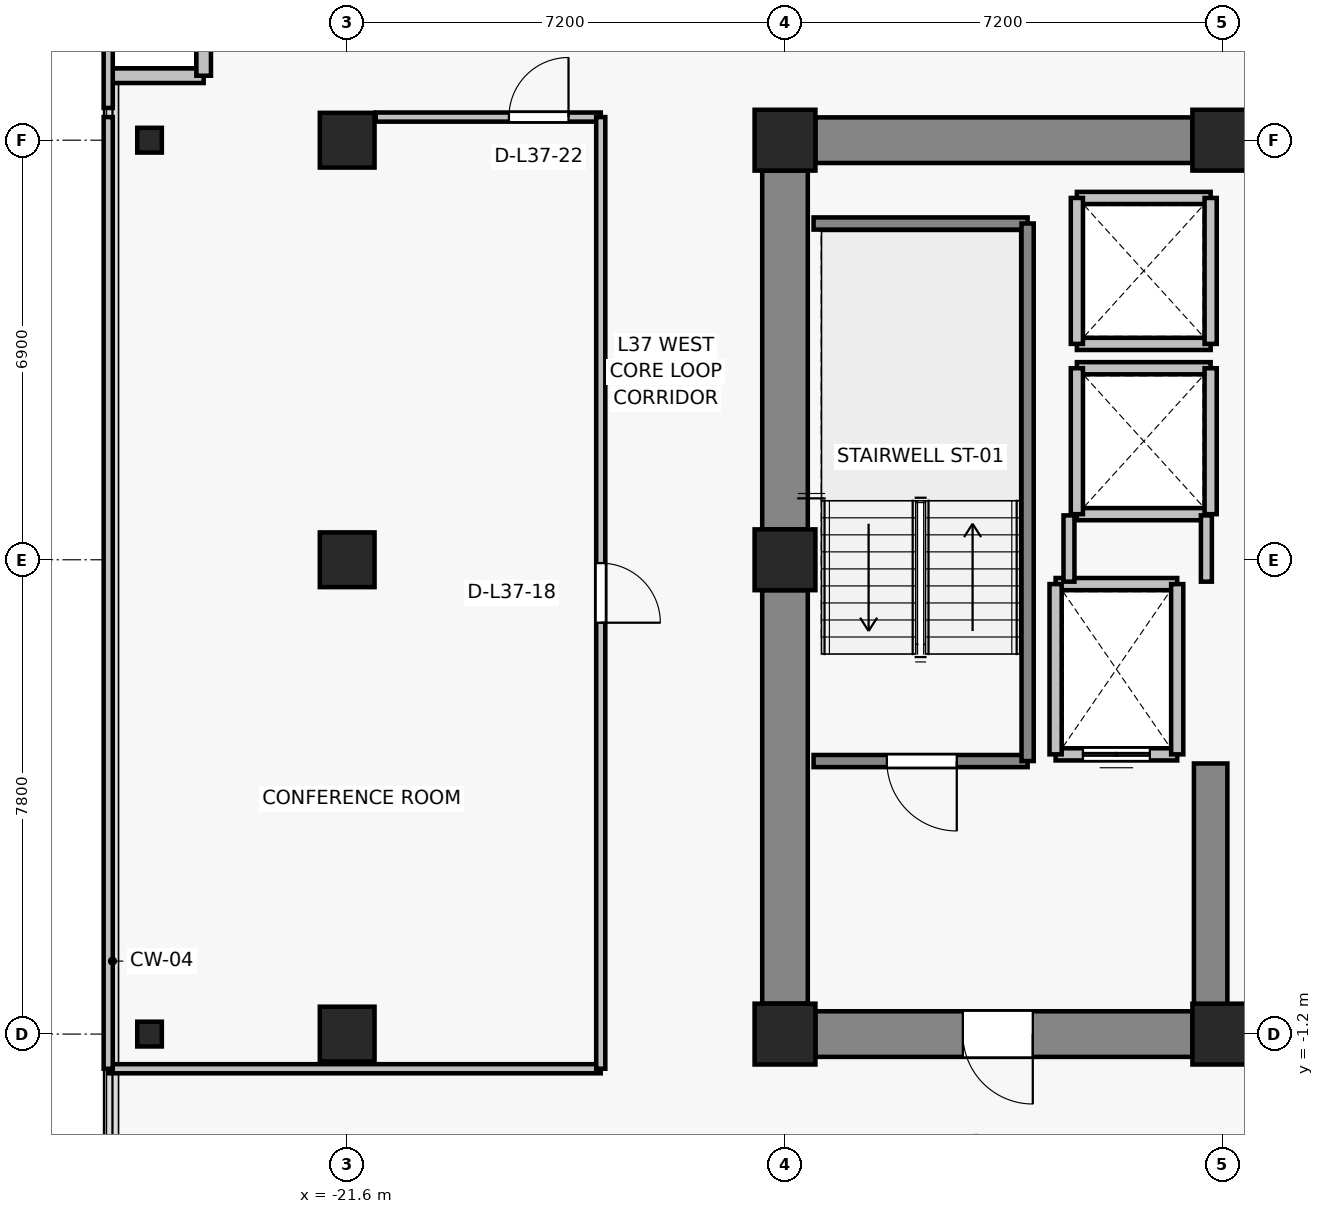
"""IFC4 building model, lengths in metres.
Left out: names, types, materials, properties, quantities, classifications, styles, units other than length and angle.
Written with IfcOpenShell. Run it as: python <this file> out.ifc"""

import sys

from ifc_helpers import new_model, si_unit, direction, frame, frame_2d, origin, origin_2d, place, context, subcontext, project, spatial, rectangle, i_section, extrude, source, transform, mapped, element, fill, save


model = new_model("IFC4")
c1 = context("Model", 3, precision=1e-05, world=origin(), true_north=direction((0.0, 1.0)))
c2 = subcontext(c1, "Body", "Model", "MODEL_VIEW")
j1 = project(units=[si_unit("LENGTHUNIT", "METRE"), si_unit("PLANEANGLEUNIT", "RADIAN")], contexts=[c1])
p1 = place(None, origin())
s1 = spatial("IfcSite", under=j1, at=p1, CompositionType="ELEMENT")
p2 = place(p1, origin())
s2 = spatial("IfcBuilding", under=s1, at=p2, CompositionType="ELEMENT")
p3 = place(p2, frame((0.0, 0.0, 133.0)))
s3 = spatial("IfcBuildingStorey", under=s2, at=p3, CompositionType="ELEMENT", Elevation=133.0)
for number, where, z_axis, x_axis in (
    (1, (-14.4, -1.2, 0.0), (0.0, 0.0, 1.0), (1.0, 0.0, 0.0)),
    (2, (-7.2, -1.2, 0.0), (0.0, 0.0, 1.0), (1.0, 0.0, 0.0)),
    (3, (-14.4, 6.6, 0.0), (0.0, 0.0, 1.0), (1.0, 0.0, 0.0)),
    (4, (-14.4, 13.5, 0.0), (0.0, 0.0, 1.0), (1.0, 0.0, 0.0)),
    (5, (-7.2, 13.5, 0.0), (0.0, 0.0, 1.0), (1.0, 0.0, 0.0)),
):
    element("IfcColumn", number, at=place(p3, frame(where, z_axis=z_axis, x_axis=x_axis)), inside=s3, PredefinedType="COLUMN", context=c2, shape_type="SweptSolid", body=[
        extrude(rectangle(XDim=1.0, YDim=1.0, at=origin_2d()), origin(), (0.0, 0.0, 1.0), 3.3),
    ])
for number, where, z_axis, x_axis in (
    (6, (-21.6, -1.2, 0.0), (0.0, 0.0, 1.0), (1.0, 0.0, 0.0)),
    (7, (-21.6, 6.6, 0.0), (0.0, 0.0, 1.0), (1.0, 0.0, 0.0)),
    (8, (-21.6, 13.5, 0.0), (0.0, 0.0, 1.0), (1.0, 0.0, 0.0)),
):
    element("IfcColumn", number, at=place(p3, frame(where, z_axis=z_axis, x_axis=x_axis)), inside=s3, PredefinedType="COLUMN", context=c2, shape_type="SweptSolid", body=[
        extrude(rectangle(XDim=0.9, YDim=0.9, at=origin_2d()), origin(), (0.0, 0.0, 1.0), 3.3),
    ])
for number, where, z_axis, x_axis in (
    (9, (-24.85, -1.2, 0.0), (0.0, 0.0, 1.0), (1.0, 0.0, 0.0)),
    (10, (-24.85, 13.5, 0.0), (0.0, 0.0, 1.0), (1.0, 0.0, 0.0)),
):
    element("IfcColumn", number, at=place(p3, frame(where, z_axis=z_axis, x_axis=x_axis)), inside=s3, PredefinedType="COLUMN", context=c2, shape_type="SweptSolid", body=[
        extrude(i_section(OverallWidth=0.404, OverallDepth=0.407, WebThickness=0.022, FlangeThickness=0.032, FilletRadius=0.015, at=origin_2d()), origin(), (0.0, 0.0, 1.0), 3.3),
    ])
p4 = place(p3, frame((-13.9, 13.5, 0.0), z_axis=(0.0, 0.0, 1.0), x_axis=(1.0, 0.0, 0.0)))
e11 = element("IfcWall", 11, at=p4, inside=s3, PredefinedType="SHEAR", context=c2, shape_type="SweptSolid", body=[
    extrude(rectangle(XDim=6.2, YDim=0.75, at=frame_2d((3.1, 0.0))), origin(), (0.0, 0.0, 1.0), 3.075),
])
p5 = place(p3, frame((-14.4, -0.7, 0.0), z_axis=(0.0, 0.0, 1.0), x_axis=(0.0, 1.0, 0.0)))
e12 = element("IfcWall", 12, at=p5, inside=s3, PredefinedType="SHEAR", context=c2, shape_type="SweptSolid", body=[
    extrude(rectangle(XDim=6.8, YDim=0.75, at=frame_2d((3.4, 0.0))), origin(), (0.0, 0.0, 1.0), 3.075),
])
p6 = place(p3, frame((-14.4, 7.1, 0.0), z_axis=(0.0, 0.0, 1.0), x_axis=(0.0, 1.0, 0.0)))
e13 = element("IfcWall", 13, at=p6, inside=s3, PredefinedType="SHEAR", context=c2, shape_type="SweptSolid", body=[
    extrude(rectangle(XDim=5.9, YDim=0.75, at=frame_2d((2.95, 0.0))), origin(), (0.0, 0.0, 1.0), 3.075),
])
p7 = place(p3, frame((-7.7, -1.2, 0.0), z_axis=(0.0, 0.0, 1.0), x_axis=(-1.0, 0.0, 0.0)))
e14 = element("IfcWall", 14, at=p7, inside=s3, PredefinedType="SHEAR", context=c2, shape_type="SweptSolid", body=[
    extrude(rectangle(XDim=6.2, YDim=0.75, at=frame_2d((3.1, 0.0))), origin(), (0.0, 0.0, 1.0), 3.075),
])
p8 = place(p7, frame((2.625, 0.0, 0.0)))
e15 = element("IfcOpeningElement", 15, at=p8, cuts=e14, PredefinedType="OPENING", context=c2, shape_type="SweptSolid", body=[
    extrude(rectangle(XDim=1.15, YDim=2.15, at=frame_2d((0.575, 1.075))), frame((0.0, 0.385, 0.0), z_axis=(0.0, -1.0, 0.0), x_axis=(1.0, 0.0, 0.0)), (0.0, 0.0, 1.0), 0.77),
])
p9 = place(p3, frame((-7.4, -0.825, 0.0), z_axis=(0.0, 0.0, 1.0), x_axis=(0.0, 1.0, 0.0)))
e16 = element("IfcWall", 16, at=p9, inside=s3, PredefinedType="SHEAR", context=c2, shape_type="SweptSolid", body=[
    extrude(rectangle(XDim=4.075, YDim=0.55, at=frame_2d((2.038, 0.0))), origin(), (0.0, 0.0, 1.0), 3.075),
])
for number, where, z_axis, x_axis in (
    (17, (-23.96, 14.56, 0.0), (0.0, 0.0, 1.0), (-1.0, 0.0, 0.0)),
    (18, (-23.96, 16.06, 0.0), (0.0, 0.0, 1.0), (0.0, -1.0, 0.0)),
):
    element("IfcWall", number, at=place(p3, frame(where, z_axis=z_axis, x_axis=x_axis)), inside=s3, PredefinedType="SOLIDWALL", context=c2, shape_type="SweptSolid", body=[
        extrude(rectangle(XDim=1.5, YDim=0.24, at=frame_2d((0.75, 0.0))), origin(), (0.0, 0.0, 1.0), 3.075),
    ])
p10 = place(p3, frame((-7.95, 3.4, 0.0), z_axis=(0.0, 0.0, 1.0), x_axis=(-1.0, 0.0, 0.0)))
e19 = element("IfcWall", 19, at=p10, inside=s3, PredefinedType="SOLIDWALL", context=c2, shape_type="SweptSolid", body=[
    extrude(rectangle(XDim=2.0, YDim=0.2, at=frame_2d((1.0, 0.0))), origin(), (0.0, 0.0, 1.0), 3.075),
])
p11 = place(p10, frame((0.45, 0.0, 0.0)))
e20 = element("IfcOpeningElement", 20, at=p11, cuts=e19, PredefinedType="OPENING", context=c2, shape_type="SweptSolid", body=[
    extrude(rectangle(XDim=1.1, YDim=2.2, at=frame_2d((0.55, 1.1))), frame((0.0, 0.11, 0.0), z_axis=(0.0, -1.0, 0.0), x_axis=(1.0, 0.0, 0.0)), (0.0, 0.0, 1.0), 0.22),
])
p12 = place(p3, frame((-9.95, 6.2, 0.0), z_axis=(0.0, 0.0, 1.0), x_axis=(1.0, 0.0, 0.0)))
e21 = element("IfcWall", 21, at=p12, inside=s3, PredefinedType="SOLIDWALL", context=c2, shape_type="SweptSolid", body=[
    extrude(rectangle(XDim=2.0, YDim=0.2, at=frame_2d((1.0, 0.0))), origin(), (0.0, 0.0, 1.0), 3.075),
])
for number, where, z_axis, x_axis in (
    (22, (-9.95, 3.4, 0.0), (0.0, 0.0, 1.0), (0.0, 1.0, 0.0)),
    (23, (-7.95, 6.2, 0.0), (0.0, 0.0, 1.0), (0.0, -1.0, 0.0)),
):
    element("IfcWall", number, at=place(p3, frame(where, z_axis=z_axis, x_axis=x_axis)), inside=s3, PredefinedType="SOLIDWALL", context=c2, shape_type="SweptSolid", body=[
        extrude(rectangle(XDim=2.8, YDim=0.2, at=frame_2d((1.4, 0.0))), origin(), (0.0, 0.0, 1.0), 3.075),
    ])
for number, where, z_axis, x_axis in (
    (24, (-7.4, 7.35, 0.0), (0.0, 0.0, 1.0), (-1.0, 0.0, 0.0)),
    (25, (-9.6, 9.75, 0.0), (0.0, 0.0, 1.0), (1.0, 0.0, 0.0)),
):
    element("IfcWall", number, at=place(p3, frame(where, z_axis=z_axis, x_axis=x_axis)), inside=s3, PredefinedType="SOLIDWALL", context=c2, shape_type="SweptSolid", body=[
        extrude(rectangle(XDim=2.2, YDim=0.2, at=frame_2d((1.1, 0.0))), origin(), (0.0, 0.0, 1.0), 2.515),
    ])
p13 = place(p3, frame((-9.6, 7.35, 0.0), z_axis=(0.0, 0.0, 1.0), x_axis=(0.0, 1.0, 0.0)))
e26 = element("IfcWall", 26, at=p13, inside=s3, PredefinedType="SOLIDWALL", context=c2, shape_type="SweptSolid", body=[
    extrude(rectangle(XDim=2.4, YDim=0.2, at=frame_2d((1.2, 0.0))), origin(), (0.0, 0.0, 1.0), 3.075),
])
p14 = place(p3, frame((-7.4, 9.75, 0.0), z_axis=(0.0, 0.0, 1.0), x_axis=(0.0, -1.0, 0.0)))
e27 = element("IfcWall", 27, at=p14, inside=s3, PredefinedType="SOLIDWALL", context=c2, shape_type="SweptSolid", body=[
    extrude(rectangle(XDim=2.4, YDim=0.2, at=frame_2d((1.2, 0.0))), origin(), (0.0, 0.0, 1.0), 2.515),
])
for number, where, z_axis, x_axis in (
    (28, (-7.4, 10.15, 0.0), (0.0, 0.0, 1.0), (-1.0, 0.0, 0.0)),
    (29, (-9.6, 12.55, 0.0), (0.0, 0.0, 1.0), (1.0, 0.0, 0.0)),
):
    element("IfcWall", number, at=place(p3, frame(where, z_axis=z_axis, x_axis=x_axis)), inside=s3, PredefinedType="SOLIDWALL", context=c2, shape_type="SweptSolid", body=[
        extrude(rectangle(XDim=2.2, YDim=0.2, at=frame_2d((1.1, 0.0))), origin(), (0.0, 0.0, 1.0), 2.515),
    ])
p15 = place(p3, frame((-9.6, 10.15, 0.0), z_axis=(0.0, 0.0, 1.0), x_axis=(0.0, 1.0, 0.0)))
e30 = element("IfcWall", 30, at=p15, inside=s3, PredefinedType="SOLIDWALL", context=c2, shape_type="SweptSolid", body=[
    extrude(rectangle(XDim=2.4, YDim=0.2, at=frame_2d((1.2, 0.0))), origin(), (0.0, 0.0, 1.0), 3.075),
])
p16 = place(p3, frame((-7.4, 12.55, 0.0), z_axis=(0.0, 0.0, 1.0), x_axis=(0.0, -1.0, 0.0)))
e31 = element("IfcWall", 31, at=p16, inside=s3, PredefinedType="SOLIDWALL", context=c2, shape_type="SweptSolid", body=[
    extrude(rectangle(XDim=2.4, YDim=0.2, at=frame_2d((1.2, 0.0))), origin(), (0.0, 0.0, 1.0), 2.515),
])
p17 = place(p3, frame((-10.41, 3.29, 0.0), z_axis=(0.0, 0.0, 1.0), x_axis=(-1.0, 0.0, 0.0)))
e32 = element("IfcWall", 32, at=p17, inside=s3, PredefinedType="SOLIDWALL", context=c2, shape_type="SweptSolid", body=[
    extrude(rectangle(XDim=3.52, YDim=0.2, at=frame_2d((1.76, 0.0))), origin(), (0.0, 0.0, 1.0), 3.075),
])
p18 = place(p17, frame((1.165, 0.0, 0.0)))
e33 = element("IfcOpeningElement", 33, at=p18, cuts=e32, PredefinedType="OPENING", context=c2, shape_type="SweptSolid", body=[
    extrude(rectangle(XDim=1.15, YDim=2.15, at=frame_2d((0.575, 1.075))), frame((0.0, 0.11, 0.0), z_axis=(0.0, -1.0, 0.0), x_axis=(1.0, 0.0, 0.0)), (0.0, 0.0, 1.0), 0.22),
])
p19 = place(p3, frame((-13.93, 12.13, 0.0), z_axis=(0.0, 0.0, 1.0), x_axis=(1.0, 0.0, 0.0)))
e34 = element("IfcWall", 34, at=p19, inside=s3, PredefinedType="SOLIDWALL", context=c2, shape_type="SweptSolid", body=[
    extrude(rectangle(XDim=3.52, YDim=0.2, at=frame_2d((1.76, 0.0))), origin(), (0.0, 0.0, 1.0), 3.075),
])
p20 = place(p3, frame((-10.41, 12.13, 0.0), z_axis=(0.0, 0.0, 1.0), x_axis=(0.0, -1.0, 0.0)))
e35 = element("IfcWall", 35, at=p20, inside=s3, PredefinedType="SOLIDWALL", context=c2, shape_type="SweptSolid", body=[
    extrude(rectangle(XDim=8.84, YDim=0.2, at=frame_2d((4.42, 0.0))), origin(), (0.0, 0.0, 1.0), 3.075),
])
p21 = place(p3, frame((-9.73, 6.24, 0.0), z_axis=(0.0, 0.0, 1.0), x_axis=(0.0, 1.0, 0.0)))
e36 = element("IfcWall", 36, at=p21, inside=s3, PredefinedType="PARTITIONING", context=c2, shape_type="SweptSolid", body=[
    extrude(rectangle(XDim=1.09, YDim=0.18, at=frame_2d((0.545, 0.0))), origin(), (0.0, 0.0, 1.0), 3.075),
])
p22 = place(p3, frame((-7.47, 7.33, 0.0), z_axis=(0.0, 0.0, 1.0), x_axis=(0.0, -1.0, 0.0)))
e37 = element("IfcWall", 37, at=p22, inside=s3, PredefinedType="PARTITIONING", context=c2, shape_type="SweptSolid", body=[
    extrude(rectangle(XDim=1.09, YDim=0.18, at=frame_2d((0.545, 0.0))), origin(), (0.0, 0.0, 1.0), 2.515),
])
p23 = place(p3, frame((-17.43, -1.77, 0.0), z_axis=(0.0, 0.0, 1.0), x_axis=(-1.0, 0.0, 0.0)))
e38 = element("IfcWall", 38, at=p23, inside=s3, PredefinedType="PARTITIONING", context=c2, shape_type="SweptSolid", body=[
    extrude(rectangle(XDim=8.1, YDim=0.15, at=frame_2d((4.05, 0.0))), origin(), (0.0, 0.0, 1.0), 2.515),
])
p24 = place(p3, frame((-21.13, 13.88, 0.0), z_axis=(0.0, 0.0, 1.0), x_axis=(1.0, 0.0, 0.0)))
e39 = element("IfcWall", 39, at=p24, inside=s3, PredefinedType="PARTITIONING", context=c2, shape_type="SweptSolid", body=[
    extrude(rectangle(XDim=3.7, YDim=0.15, at=frame_2d((1.85, 0.0))), origin(), (0.0, 0.0, 1.0), 3.075),
])
p25 = place(p24, frame((2.19, 0.0, 0.0)))
e40 = element("IfcOpeningElement", 40, at=p25, cuts=e39, PredefinedType="OPENING", context=c2, shape_type="SweptSolid", body=[
    extrude(rectangle(XDim=0.98, YDim=2.15, at=frame_2d((0.49, 1.075))), frame((0.0, 0.085, 0.0), z_axis=(0.0, -1.0, 0.0), x_axis=(1.0, 0.0, 0.0)), (0.0, 0.0, 1.0), 0.17),
])
p26 = place(p3, frame((-25.53, -1.77, 0.0), z_axis=(0.0, 0.0, 1.0), x_axis=(0.0, 1.0, 0.0)))
e41 = element("IfcWall", 41, at=p26, inside=s3, PredefinedType="PARTITIONING", context=c2, shape_type="SweptSolid", body=[
    extrude(rectangle(XDim=15.65, YDim=0.15, at=frame_2d((7.825, 0.0))), origin(), (0.0, 0.0, 1.0), 3.075),
])
p27 = place(p3, frame((-17.43, 13.88, 0.0), z_axis=(0.0, 0.0, 1.0), x_axis=(0.0, -1.0, 0.0)))
e42 = element("IfcWall", 42, at=p27, inside=s3, PredefinedType="PARTITIONING", context=c2, shape_type="SweptSolid", body=[
    extrude(rectangle(XDim=15.65, YDim=0.15, at=frame_2d((7.825, 0.0))), origin(), (0.0, 0.0, 1.0), 2.515),
])
p28 = place(p27, frame((7.335, 0.0, 0.0)))
e43 = element("IfcOpeningElement", 43, at=p28, cuts=e42, PredefinedType="OPENING", context=c2, shape_type="SweptSolid", body=[
    extrude(rectangle(XDim=0.98, YDim=2.15, at=frame_2d((0.49, 1.075))), frame((0.0, 0.085, 0.0), z_axis=(0.0, -1.0, 0.0), x_axis=(1.0, 0.0, 0.0)), (0.0, 0.0, 1.0), 0.17),
])
p29 = place(p3, frame((-25.53, 14.03, 0.0), z_axis=(0.0, 0.0, 1.0), x_axis=(0.0, 1.0, 0.0)))
e44 = element("IfcWall", 44, at=p29, inside=s3, PredefinedType="PARTITIONING", context=c2, shape_type="SweptSolid", body=[
    extrude(rectangle(XDim=3.6, YDim=0.15, at=frame_2d((1.8, 0.0))), origin(), (0.0, 0.0, 1.0), 3.075),
])
m1 = source(origin(), c2, "Body", "SweptSolid", [
    extrude(rectangle(XDim=1.1, YDim=2.2, at=frame_2d((0.55, 1.1))), frame((0.0, 0.025, 0.0), z_axis=(0.0, -1.0, 0.0), x_axis=(1.0, 0.0, 0.0)), (0.0, 0.0, 1.0), 0.05),
])
p30 = place(p11, origin())
e45 = element("IfcDoor", 45, at=p30, inside=s3, OperationType="DOUBLE_DOOR_SLIDING", PredefinedType="DOOR", context=c2, shape_type="MappedRepresentation", body=[
    mapped(m1, transform((0.0, 0.0, 0.0), x_axis=(1.0, 0.0, 0.0), y_axis=(0.0, 1.0, 0.0), z_axis=(0.0, 0.0, 1.0), scale=1.0)),
])
fill(e20, e45)
m2 = source(origin(), c2, "Body", "SweptSolid", [
    extrude(rectangle(XDim=1.15, YDim=2.15, at=frame_2d((0.575, 1.075))), frame((0.0, 0.025, 0.0), z_axis=(0.0, -1.0, 0.0), x_axis=(1.0, 0.0, 0.0)), (0.0, 0.0, 1.0), 0.05),
])
p31 = place(p18, origin())
e46 = element("IfcDoor", 46, at=p31, inside=s3, OperationType="SINGLE_SWING_LEFT", PredefinedType="DOOR", context=c2, shape_type="MappedRepresentation", body=[
    mapped(m2, transform((0.0, 0.0, 0.0), x_axis=(1.0, 0.0, 0.0), y_axis=(0.0, 1.0, 0.0), z_axis=(0.0, 0.0, 1.0), scale=1.0)),
])
fill(e33, e46)
p32 = place(p8, origin())
e47 = element("IfcDoor", 47, at=p32, inside=s3, OperationType="SINGLE_SWING_LEFT", PredefinedType="DOOR", context=c2, shape_type="MappedRepresentation", body=[
    mapped(m2, transform((0.0, 0.0, 0.0), x_axis=(1.0, 0.0, 0.0), y_axis=(0.0, 1.0, 0.0), z_axis=(0.0, 0.0, 1.0), scale=1.0)),
])
fill(e15, e47)
m3 = source(origin(), c2, "Body", "SweptSolid", [
    extrude(rectangle(XDim=0.98, YDim=2.15, at=frame_2d((0.49, 1.075))), frame((0.0, 0.025, 0.0), z_axis=(0.0, -1.0, 0.0), x_axis=(1.0, 0.0, 0.0)), (0.0, 0.0, 1.0), 0.05),
])
p33 = place(p28, origin())
e48 = element("IfcDoor", 48, at=p33, inside=s3, OperationType="SINGLE_SWING_RIGHT", PredefinedType="DOOR", context=c2, shape_type="MappedRepresentation", body=[
    mapped(m3, transform((0.0, 0.0, 0.0), x_axis=(1.0, 0.0, 0.0), y_axis=(0.0, 1.0, 0.0), z_axis=(0.0, 0.0, 1.0), scale=1.0)),
])
fill(e43, e48)
p34 = place(p25, origin())
e49 = element("IfcDoor", 49, at=p34, inside=s3, OperationType="SINGLE_SWING_RIGHT", PredefinedType="DOOR", context=c2, shape_type="MappedRepresentation", body=[
    mapped(m3, transform((0.0, 0.0, 0.0), x_axis=(1.0, 0.0, 0.0), y_axis=(0.0, 1.0, 0.0), z_axis=(0.0, 0.0, 1.0), scale=1.0)),
])
fill(e40, e49)
save(model, sys.argv[1])
